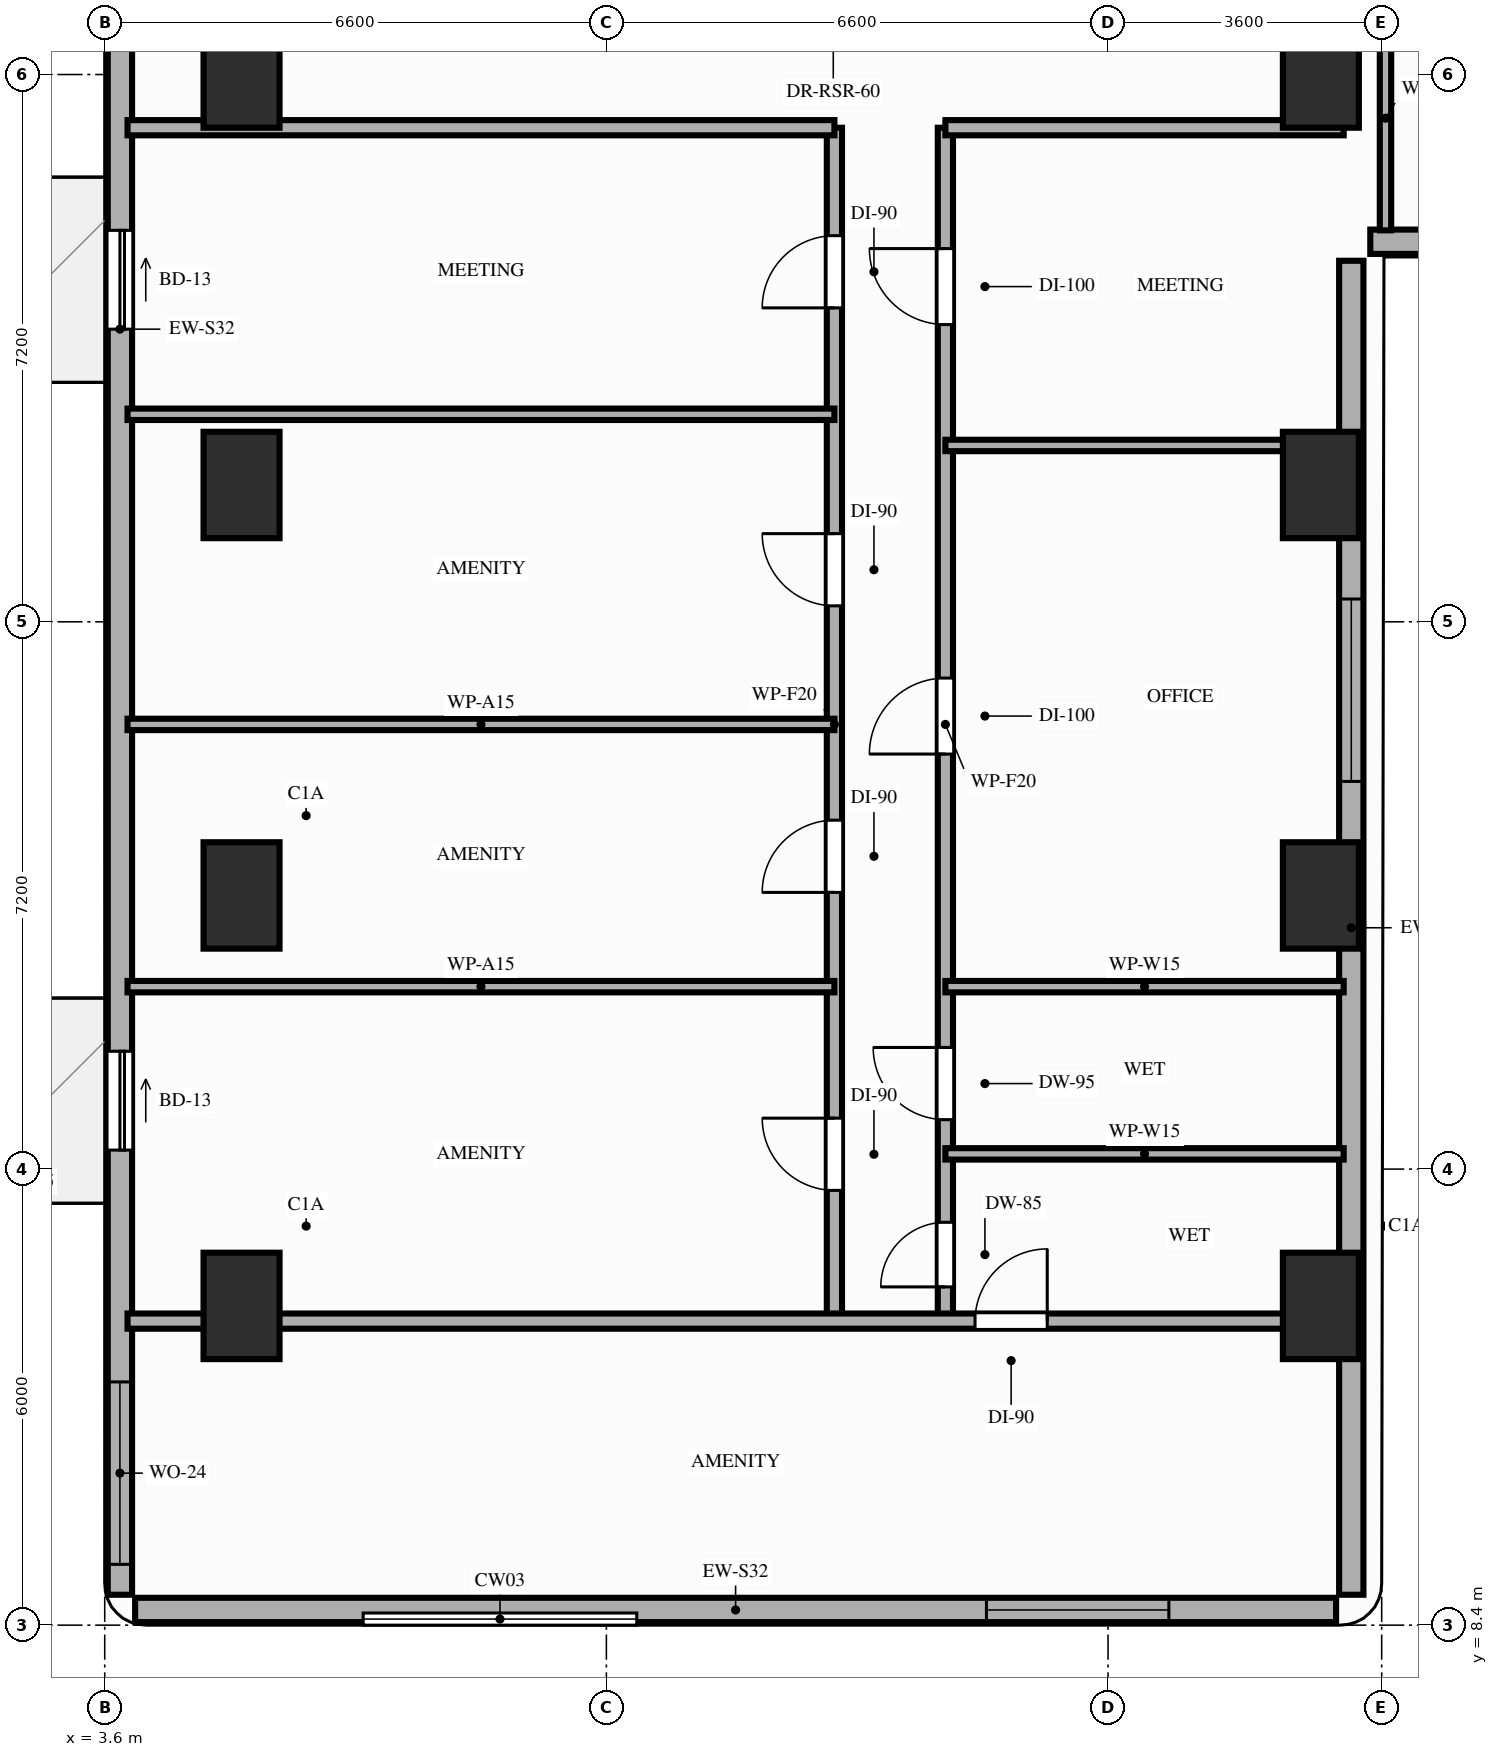
"""IFC4 building model, lengths in metres.
Left out: names, types, materials, properties, quantities, classifications, styles, units other than length and angle.
Written with IfcOpenShell. Run it as: python <this file> out.ifc"""

import sys

from ifc_helpers import new_model, si_unit, direction, frame, frame_2d, origin, origin_2d, place, context, subcontext, project, spatial, rectangle, extrude, element, fill, save


model = new_model("IFC4")
c1 = context("Model", 3, precision=1e-05, world=origin(), true_north=direction((0.0, 1.0)))
c2 = subcontext(c1, "Body", "Model", "MODEL_VIEW")
j1 = project(units=[si_unit("LENGTHUNIT", "METRE"), si_unit("PLANEANGLEUNIT", "RADIAN")], contexts=[c1])
p1 = place(None, origin())
s1 = spatial("IfcSite", under=j1, at=p1, CompositionType="ELEMENT")
p2 = place(p1, origin())
s2 = spatial("IfcBuilding", under=s1, at=p2, CompositionType="ELEMENT")
p3 = place(p2, frame((0.0, 0.0, 43.6)))
s3 = spatial("IfcBuildingStorey", under=s2, at=p3, CompositionType="ELEMENT", Elevation=43.6)
for number, where, z_axis, x_axis in (
    (1, (5.4, 12.6, 0.0), (0.0, 0.0, 1.0), (1.0, 0.0, 0.0)),
    (2, (19.6, 12.6, 0.0), (0.0, 0.0, 1.0), (1.0, 0.0, 0.0)),
    (3, (5.4, 18.0, 0.0), (0.0, 0.0, 1.0), (1.0, 0.0, 0.0)),
    (4, (19.6, 18.0, 0.0), (0.0, 0.0, 1.0), (1.0, 0.0, 0.0)),
    (5, (5.4, 23.4, 0.0), (0.0, 0.0, 1.0), (1.0, 0.0, 0.0)),
    (6, (19.6, 23.4, 0.0), (0.0, 0.0, 1.0), (1.0, 0.0, 0.0)),
    (7, (5.4, 28.8, 0.0), (0.0, 0.0, 1.0), (1.0, 0.0, 0.0)),
    (8, (19.6, 28.8, 0.0), (0.0, 0.0, 1.0), (1.0, 0.0, 0.0)),
):
    element("IfcColumn", number, at=place(p3, frame(where, z_axis=z_axis, x_axis=x_axis)), inside=s3, PredefinedType="COLUMN", context=c2, shape_type="SweptSolid", body=[
        extrude(rectangle(XDim=1.0, YDim=1.4, at=origin_2d()), origin(), (0.0, 0.0, 1.0), 3.2),
    ])
p4 = place(p3, frame((4.0, 8.6, 0.0), z_axis=(0.0, 0.0, 1.0), x_axis=(1.0, 0.0, 0.0)))
e9 = element("IfcWall", 9, at=p4, inside=s3, PredefinedType="STANDARD", context=c2, shape_type="SweptSolid", body=[
    extrude(rectangle(XDim=15.8, YDim=0.32, at=frame_2d((7.9, 0.0))), origin(), (0.0, 0.0, 1.0), 3.02),
])
p5 = place(p4, frame((11.2, 0.0, 0.85)))
e10 = element("IfcOpeningElement", 10, at=p5, cuts=e9, PredefinedType="OPENING", context=c2, shape_type="SweptSolid", body=[
    extrude(rectangle(XDim=2.4, YDim=1.8, at=frame_2d((1.2, 0.9))), frame((0.0, 0.17, 0.0), z_axis=(0.0, -1.0, 0.0), x_axis=(1.0, 0.0, 0.0)), (0.0, 0.0, 1.0), 0.34),
])
p6 = place(p3, frame((3.8, 42.1, 0.0), z_axis=(0.0, 0.0, 1.0), x_axis=(0.0, -1.0, 0.0)))
e11 = element("IfcWall", 11, at=p6, inside=s3, PredefinedType="STANDARD", context=c2, shape_type="SweptSolid", body=[
    extrude(rectangle(XDim=33.3, YDim=0.32, at=frame_2d((16.65, 0.0))), origin(), (0.0, 0.0, 1.0), 2.7),
])
p7 = place(p6, frame((26.15, 0.0, 0.0)))
e12 = element("IfcOpeningElement", 12, at=p7, cuts=e11, PredefinedType="OPENING", context=c2, shape_type="SweptSolid", body=[
    extrude(rectangle(XDim=1.3, YDim=2.08, at=frame_2d((0.65, 1.04))), frame((0.0, 0.17, 0.0), z_axis=(0.0, -1.0, 0.0), x_axis=(1.0, 0.0, 0.0)), (0.0, 0.0, 1.0), 0.34),
])
p8 = place(p6, frame((15.35, 0.0, 0.0)))
e13 = element("IfcOpeningElement", 13, at=p8, cuts=e11, PredefinedType="OPENING", context=c2, shape_type="SweptSolid", body=[
    extrude(rectangle(XDim=1.3, YDim=2.08, at=frame_2d((0.65, 1.04))), frame((0.0, 0.17, 0.0), z_axis=(0.0, -1.0, 0.0), x_axis=(1.0, 0.0, 0.0)), (0.0, 0.0, 1.0), 0.34),
])
p9 = place(p6, frame((30.5, 0.0, 0.85)))
e14 = element("IfcOpeningElement", 14, at=p9, cuts=e11, PredefinedType="OPENING", context=c2, shape_type="SweptSolid", body=[
    extrude(rectangle(XDim=2.4, YDim=1.6, at=frame_2d((1.2, 0.8))), frame((0.0, 0.17, 0.0), z_axis=(0.0, -1.0, 0.0), x_axis=(1.0, 0.0, 0.0)), (0.0, 0.0, 1.0), 0.34),
])
p10 = place(p6, frame((9.6, 0.0, 0.85)))
e15 = element("IfcOpeningElement", 15, at=p10, cuts=e11, PredefinedType="OPENING", context=c2, shape_type="SweptSolid", body=[
    extrude(rectangle(XDim=2.4, YDim=1.6, at=frame_2d((1.2, 0.8))), frame((0.0, 0.17, 0.0), z_axis=(0.0, -1.0, 0.0), x_axis=(1.0, 0.0, 0.0)), (0.0, 0.0, 1.0), 0.34),
])
p11 = place(p6, frame((3.5, 0.0, 0.85)))
e16 = element("IfcOpeningElement", 16, at=p11, cuts=e11, PredefinedType="OPENING", context=c2, shape_type="SweptSolid", body=[
    extrude(rectangle(XDim=2.4, YDim=1.6, at=frame_2d((1.2, 0.8))), frame((0.0, 0.17, 0.0), z_axis=(0.0, -1.0, 0.0), x_axis=(1.0, 0.0, 0.0)), (0.0, 0.0, 1.0), 0.34),
])
p12 = place(p3, frame((20.0, 8.8, 0.0), z_axis=(0.0, 0.0, 1.0), x_axis=(0.0, 1.0, 0.0)))
e17 = element("IfcWall", 17, at=p12, inside=s3, PredefinedType="STANDARD", context=c2, shape_type="SweptSolid", body=[
    extrude(rectangle(XDim=17.55, YDim=0.32, at=frame_2d((8.775, 0.0))), origin(), (0.0, 0.0, 1.0), 2.41),
])
p13 = place(p12, frame((10.7, 0.0, 0.85)))
e18 = element("IfcOpeningElement", 18, at=p13, cuts=e17, PredefinedType="OPENING", context=c2, shape_type="SweptSolid", body=[
    extrude(rectangle(XDim=2.4, YDim=1.31, at=frame_2d((1.2, 0.655))), frame((0.0, 0.17, 0.0), z_axis=(0.0, -1.0, 0.0), x_axis=(1.0, 0.0, 0.0)), (0.0, 0.0, 1.0), 0.34),
])
p14 = place(p3, frame((20.25, 26.6, 0.0), z_axis=(0.0, 0.0, 1.0), x_axis=(1.0, 0.0, 0.0)))
e19 = element("IfcWall", 19, at=p14, inside=s3, PredefinedType="STANDARD", context=c2, shape_type="SweptSolid", body=[
    extrude(rectangle(XDim=26.15, YDim=0.32, at=frame_2d((13.075, 0.0))), origin(), (0.0, 0.0, 1.0), 2.7),
])
p15 = place(p14, frame((1.95, 0.0, 0.85)))
e20 = element("IfcOpeningElement", 20, at=p15, cuts=e19, PredefinedType="OPENING", context=c2, shape_type="SweptSolid", body=[
    extrude(rectangle(XDim=2.4, YDim=1.6, at=frame_2d((1.2, 0.8))), frame((0.0, 0.17, 0.0), z_axis=(0.0, -1.0, 0.0), x_axis=(1.0, 0.0, 0.0)), (0.0, 0.0, 1.0), 0.34),
])
p16 = place(p14, frame((7.45, 0.0, 0.85)))
e21 = element("IfcOpeningElement", 21, at=p16, cuts=e19, PredefinedType="OPENING", context=c2, shape_type="SweptSolid", body=[
    extrude(rectangle(XDim=2.4, YDim=1.6, at=frame_2d((1.2, 0.8))), frame((0.0, 0.17, 0.0), z_axis=(0.0, -1.0, 0.0), x_axis=(1.0, 0.0, 0.0)), (0.0, 0.0, 1.0), 0.34),
])
p17 = place(p14, frame((21.95, 0.0, 0.85)))
e22 = element("IfcOpeningElement", 22, at=p17, cuts=e19, PredefinedType="OPENING", context=c2, shape_type="SweptSolid", body=[
    extrude(rectangle(XDim=2.4, YDim=1.6, at=frame_2d((1.2, 0.8))), frame((0.0, 0.17, 0.0), z_axis=(0.0, -1.0, 0.0), x_axis=(1.0, 0.0, 0.0)), (0.0, 0.0, 1.0), 0.34),
])
p18 = place(p3, frame((13.2, 12.4, 0.0), z_axis=(0.0, 0.0, 1.0), x_axis=(0.0, 1.0, 0.0)))
e23 = element("IfcWall", 23, at=p18, inside=s3, PredefinedType="PARTITIONING", context=c2, shape_type="SweptSolid", body=[
    extrude(rectangle(XDim=15.7, YDim=0.2, at=frame_2d((7.85, 0.0))), origin(), (0.0, 0.0, 1.0), 2.41),
])
p19 = place(p18, frame((1.72, 0.0, 0.0)))
e24 = element("IfcOpeningElement", 24, at=p19, cuts=e23, PredefinedType="OPENING", context=c2, shape_type="SweptSolid", body=[
    extrude(rectangle(XDim=0.95, YDim=2.15, at=frame_2d((0.475, 1.075))), frame((0.0, 0.11, 0.0), z_axis=(0.0, -1.0, 0.0), x_axis=(1.0, 0.0, 0.0)), (0.0, 0.0, 1.0), 0.22),
])
p20 = place(p18, frame((5.64, 0.0, 0.0)))
e25 = element("IfcOpeningElement", 25, at=p20, cuts=e23, PredefinedType="OPENING", context=c2, shape_type="SweptSolid", body=[
    extrude(rectangle(XDim=0.95, YDim=2.15, at=frame_2d((0.475, 1.075))), frame((0.0, 0.11, 0.0), z_axis=(0.0, -1.0, 0.0), x_axis=(1.0, 0.0, 0.0)), (0.0, 0.0, 1.0), 0.22),
])
p21 = place(p18, frame((9.41, 0.0, 0.0)))
e26 = element("IfcOpeningElement", 26, at=p21, cuts=e23, PredefinedType="OPENING", context=c2, shape_type="SweptSolid", body=[
    extrude(rectangle(XDim=0.95, YDim=2.15, at=frame_2d((0.475, 1.075))), frame((0.0, 0.11, 0.0), z_axis=(0.0, -1.0, 0.0), x_axis=(1.0, 0.0, 0.0)), (0.0, 0.0, 1.0), 0.22),
])
p22 = place(p18, frame((13.33, 0.0, 0.0)))
e27 = element("IfcOpeningElement", 27, at=p22, cuts=e23, PredefinedType="OPENING", context=c2, shape_type="SweptSolid", body=[
    extrude(rectangle(XDim=0.95, YDim=2.15, at=frame_2d((0.475, 1.075))), frame((0.0, 0.11, 0.0), z_axis=(0.0, -1.0, 0.0), x_axis=(1.0, 0.0, 0.0)), (0.0, 0.0, 1.0), 0.22),
])
p23 = place(p3, frame((14.66, 12.4, 0.0), z_axis=(0.0, 0.0, 1.0), x_axis=(0.0, 1.0, 0.0)))
e28 = element("IfcWall", 28, at=p23, inside=s3, PredefinedType="PARTITIONING", context=c2, shape_type="SweptSolid", body=[
    extrude(rectangle(XDim=15.7, YDim=0.2, at=frame_2d((7.85, 0.0))), origin(), (0.0, 0.0, 1.0), 2.41),
])
p24 = place(p23, frame((0.45, 0.0, 0.0)))
e29 = element("IfcOpeningElement", 29, at=p24, cuts=e28, PredefinedType="OPENING", context=c2, shape_type="SweptSolid", body=[
    extrude(rectangle(XDim=0.85, YDim=2.1, at=frame_2d((0.425, 1.05))), frame((0.0, 0.11, 0.0), z_axis=(0.0, -1.0, 0.0), x_axis=(1.0, 0.0, 0.0)), (0.0, 0.0, 1.0), 0.22),
])
p25 = place(p23, frame((2.65, 0.0, 0.0)))
e30 = element("IfcOpeningElement", 30, at=p25, cuts=e28, PredefinedType="OPENING", context=c2, shape_type="SweptSolid", body=[
    extrude(rectangle(XDim=0.95, YDim=2.1, at=frame_2d((0.475, 1.05))), frame((0.0, 0.11, 0.0), z_axis=(0.0, -1.0, 0.0), x_axis=(1.0, 0.0, 0.0)), (0.0, 0.0, 1.0), 0.22),
])
p26 = place(p23, frame((7.46, 0.0, 0.0)))
e31 = element("IfcOpeningElement", 31, at=p26, cuts=e28, PredefinedType="OPENING", context=c2, shape_type="SweptSolid", body=[
    extrude(rectangle(XDim=1.0, YDim=2.15, at=frame_2d((0.5, 1.075))), frame((0.0, 0.11, 0.0), z_axis=(0.0, -1.0, 0.0), x_axis=(1.0, 0.0, 0.0)), (0.0, 0.0, 1.0), 0.22),
])
p27 = place(p23, frame((13.11, 0.0, 0.0)))
e32 = element("IfcOpeningElement", 32, at=p27, cuts=e28, PredefinedType="OPENING", context=c2, shape_type="SweptSolid", body=[
    extrude(rectangle(XDim=1.0, YDim=2.15, at=frame_2d((0.5, 1.075))), frame((0.0, 0.11, 0.0), z_axis=(0.0, -1.0, 0.0), x_axis=(1.0, 0.0, 0.0)), (0.0, 0.0, 1.0), 0.22),
])
p28 = place(p3, frame((3.9, 12.4, 0.0), z_axis=(0.0, 0.0, 1.0), x_axis=(1.0, 0.0, 0.0)))
e33 = element("IfcWall", 33, at=p28, inside=s3, PredefinedType="PARTITIONING", context=c2, shape_type="SweptSolid", body=[
    extrude(rectangle(XDim=16.0, YDim=0.2, at=frame_2d((8.0, 0.0))), origin(), (0.0, 0.0, 1.0), 2.41),
])
p29 = place(p28, frame((11.15, 0.0, 0.0)))
e34 = element("IfcOpeningElement", 34, at=p29, cuts=e33, PredefinedType="OPENING", context=c2, shape_type="SweptSolid", body=[
    extrude(rectangle(XDim=0.95, YDim=2.15, at=frame_2d((0.475, 1.075))), frame((0.0, 0.11, 0.0), z_axis=(0.0, -1.0, 0.0), x_axis=(1.0, 0.0, 0.0)), (0.0, 0.0, 1.0), 0.22),
])
p30 = place(p3, frame((3.9, 28.1, 0.0), z_axis=(0.0, 0.0, 1.0), x_axis=(1.0, 0.0, 0.0)))
e35 = element("IfcWall", 35, at=p30, inside=s3, PredefinedType="PARTITIONING", context=c2, shape_type="SweptSolid", body=[
    extrude(rectangle(XDim=9.3, YDim=0.2, at=frame_2d((4.65, 0.0))), origin(), (0.0, 0.0, 1.0), 2.41),
])
p31 = place(p3, frame((14.66, 28.1, 0.0), z_axis=(0.0, 0.0, 1.0), x_axis=(1.0, 0.0, 0.0)))
e36 = element("IfcWall", 36, at=p31, inside=s3, PredefinedType="PARTITIONING", context=c2, shape_type="SweptSolid", body=[
    extrude(rectangle(XDim=5.24, YDim=0.2, at=frame_2d((2.62, 0.0))), origin(), (0.0, 0.0, 1.0), 2.41),
])
p32 = place(p3, frame((20.45, 26.75, 0.0), z_axis=(0.0, 0.0, 1.0), x_axis=(0.0, 1.0, 0.0)))
e37 = element("IfcWall", 37, at=p32, inside=s3, PredefinedType="PARTITIONING", context=c2, shape_type="SweptSolid", body=[
    extrude(rectangle(XDim=2.95, YDim=0.15, at=frame_2d((1.475, 0.0))), origin(), (0.0, 0.0, 1.0), 2.41),
])
for number, where, z_axis, x_axis in (
    (38, (3.9, 16.8, 0.0), (0.0, 0.0, 1.0), (1.0, 0.0, 0.0)),
    (39, (3.9, 20.25, 0.0), (0.0, 0.0, 1.0), (1.0, 0.0, 0.0)),
    (40, (3.9, 24.33, 0.0), (0.0, 0.0, 1.0), (1.0, 0.0, 0.0)),
):
    element("IfcWall", number, at=place(p3, frame(where, z_axis=z_axis, x_axis=x_axis)), inside=s3, PredefinedType="PARTITIONING", context=c2, shape_type="SweptSolid", body=[
        extrude(rectangle(XDim=9.3, YDim=0.15, at=frame_2d((4.65, 0.0))), origin(), (0.0, 0.0, 1.0), 2.41),
    ])
for number, where, z_axis, x_axis in (
    (41, (14.66, 14.6, 0.0), (0.0, 0.0, 1.0), (1.0, 0.0, 0.0)),
    (42, (14.66, 16.8, 0.0), (0.0, 0.0, 1.0), (1.0, 0.0, 0.0)),
    (43, (14.66, 23.92, 0.0), (0.0, 0.0, 1.0), (1.0, 0.0, 0.0)),
):
    element("IfcWall", number, at=place(p3, frame(where, z_axis=z_axis, x_axis=x_axis)), inside=s3, PredefinedType="PARTITIONING", context=c2, shape_type="SweptSolid", body=[
        extrude(rectangle(XDim=5.24, YDim=0.15, at=frame_2d((2.62, 0.0))), origin(), (0.0, 0.0, 1.0), 2.41),
    ])
p33 = place(p7, origin())
e44 = element("IfcDoor", 44, at=p33, inside=s3, OperationType="SLIDING_TO_LEFT", PredefinedType="DOOR", context=c2, shape_type="SweptSolid", body=[
    extrude(rectangle(XDim=1.3, YDim=2.08, at=frame_2d((0.65, 1.04))), frame((0.0, 0.025, 0.0), z_axis=(0.0, -1.0, 0.0), x_axis=(1.0, 0.0, 0.0)), (0.0, 0.0, 1.0), 0.05),
])
fill(e12, e44)
p34 = place(p8, origin())
e45 = element("IfcDoor", 45, at=p34, inside=s3, OperationType="SLIDING_TO_LEFT", PredefinedType="DOOR", context=c2, shape_type="SweptSolid", body=[
    extrude(rectangle(XDim=1.3, YDim=2.08, at=frame_2d((0.65, 1.04))), frame((0.0, 0.025, 0.0), z_axis=(0.0, -1.0, 0.0), x_axis=(1.0, 0.0, 0.0)), (0.0, 0.0, 1.0), 0.05),
])
fill(e13, e45)
p35 = place(p9, origin())
e46 = element("IfcWindow", 46, at=p35, inside=s3, PartitioningType="SINGLE_PANEL", PredefinedType="WINDOW", context=c2, shape_type="SweptSolid", body=[
    extrude(rectangle(XDim=2.4, YDim=1.6, at=frame_2d((1.2, 0.8))), frame((0.0, 0.03, 0.0), z_axis=(0.0, -1.0, 0.0), x_axis=(1.0, 0.0, 0.0)), (0.0, 0.0, 1.0), 0.06),
])
fill(e14, e46)
p36 = place(p13, origin())
e47 = element("IfcWindow", 47, at=p36, inside=s3, PartitioningType="SINGLE_PANEL", PredefinedType="WINDOW", context=c2, shape_type="SweptSolid", body=[
    extrude(rectangle(XDim=2.4, YDim=1.31, at=frame_2d((1.2, 0.655))), frame((0.0, 0.03, 0.0), z_axis=(0.0, -1.0, 0.0), x_axis=(1.0, 0.0, 0.0)), (0.0, 0.0, 1.0), 0.06),
])
fill(e18, e47)
p37 = place(p5, origin())
e48 = element("IfcWindow", 48, at=p37, inside=s3, PartitioningType="SINGLE_PANEL", PredefinedType="WINDOW", context=c2, shape_type="SweptSolid", body=[
    extrude(rectangle(XDim=2.4, YDim=1.8, at=frame_2d((1.2, 0.9))), frame((0.0, 0.03, 0.0), z_axis=(0.0, -1.0, 0.0), x_axis=(1.0, 0.0, 0.0)), (0.0, 0.0, 1.0), 0.06),
])
fill(e10, e48)
p38 = place(p19, origin())
e49 = element("IfcDoor", 49, at=p38, inside=s3, OperationType="SINGLE_SWING_RIGHT", PredefinedType="DOOR", context=c2, shape_type="SweptSolid", body=[
    extrude(rectangle(XDim=0.95, YDim=2.15, at=frame_2d((0.475, 1.075))), frame((0.0, 0.025, 0.0), z_axis=(0.0, -1.0, 0.0), x_axis=(1.0, 0.0, 0.0)), (0.0, 0.0, 1.0), 0.05),
])
fill(e24, e49)
p39 = place(p20, origin())
e50 = element("IfcDoor", 50, at=p39, inside=s3, OperationType="SINGLE_SWING_LEFT", PredefinedType="DOOR", context=c2, shape_type="SweptSolid", body=[
    extrude(rectangle(XDim=0.95, YDim=2.15, at=frame_2d((0.475, 1.075))), frame((0.0, 0.025, 0.0), z_axis=(0.0, -1.0, 0.0), x_axis=(1.0, 0.0, 0.0)), (0.0, 0.0, 1.0), 0.05),
])
fill(e25, e50)
p40 = place(p21, origin())
e51 = element("IfcDoor", 51, at=p40, inside=s3, OperationType="SINGLE_SWING_RIGHT", PredefinedType="DOOR", context=c2, shape_type="SweptSolid", body=[
    extrude(rectangle(XDim=0.95, YDim=2.15, at=frame_2d((0.475, 1.075))), frame((0.0, 0.025, 0.0), z_axis=(0.0, -1.0, 0.0), x_axis=(1.0, 0.0, 0.0)), (0.0, 0.0, 1.0), 0.05),
])
fill(e26, e51)
p41 = place(p22, origin())
e52 = element("IfcDoor", 52, at=p41, inside=s3, OperationType="SINGLE_SWING_LEFT", PredefinedType="DOOR", context=c2, shape_type="SweptSolid", body=[
    extrude(rectangle(XDim=0.95, YDim=2.15, at=frame_2d((0.475, 1.075))), frame((0.0, 0.025, 0.0), z_axis=(0.0, -1.0, 0.0), x_axis=(1.0, 0.0, 0.0)), (0.0, 0.0, 1.0), 0.05),
])
fill(e27, e52)
p42 = place(p29, origin())
e53 = element("IfcDoor", 53, at=p42, inside=s3, OperationType="SINGLE_SWING_RIGHT", PredefinedType="DOOR", context=c2, shape_type="SweptSolid", body=[
    extrude(rectangle(XDim=0.95, YDim=2.15, at=frame_2d((0.475, 1.075))), frame((0.0, 0.025, 0.0), z_axis=(0.0, -1.0, 0.0), x_axis=(1.0, 0.0, 0.0)), (0.0, 0.0, 1.0), 0.05),
])
fill(e34, e53)
p43 = place(p24, origin())
e54 = element("IfcDoor", 54, at=p43, inside=s3, OperationType="SINGLE_SWING_LEFT", PredefinedType="DOOR", context=c2, shape_type="SweptSolid", body=[
    extrude(rectangle(XDim=0.85, YDim=2.1, at=frame_2d((0.425, 1.05))), frame((0.0, 0.025, 0.0), z_axis=(0.0, -1.0, 0.0), x_axis=(1.0, 0.0, 0.0)), (0.0, 0.0, 1.0), 0.05),
])
fill(e29, e54)
p44 = place(p25, origin())
e55 = element("IfcDoor", 55, at=p44, inside=s3, OperationType="SINGLE_SWING_RIGHT", PredefinedType="DOOR", context=c2, shape_type="SweptSolid", body=[
    extrude(rectangle(XDim=0.95, YDim=2.1, at=frame_2d((0.475, 1.05))), frame((0.0, 0.025, 0.0), z_axis=(0.0, -1.0, 0.0), x_axis=(1.0, 0.0, 0.0)), (0.0, 0.0, 1.0), 0.05),
])
fill(e30, e55)
p45 = place(p26, origin())
e56 = element("IfcDoor", 56, at=p45, inside=s3, OperationType="SINGLE_SWING_LEFT", PredefinedType="DOOR", context=c2, shape_type="SweptSolid", body=[
    extrude(rectangle(XDim=1.0, YDim=2.15, at=frame_2d((0.5, 1.075))), frame((0.0, 0.025, 0.0), z_axis=(0.0, -1.0, 0.0), x_axis=(1.0, 0.0, 0.0)), (0.0, 0.0, 1.0), 0.05),
])
fill(e31, e56)
p46 = place(p27, origin())
e57 = element("IfcDoor", 57, at=p46, inside=s3, OperationType="SINGLE_SWING_RIGHT", PredefinedType="DOOR", context=c2, shape_type="SweptSolid", body=[
    extrude(rectangle(XDim=1.0, YDim=2.15, at=frame_2d((0.5, 1.075))), frame((0.0, 0.025, 0.0), z_axis=(0.0, -1.0, 0.0), x_axis=(1.0, 0.0, 0.0)), (0.0, 0.0, 1.0), 0.05),
])
fill(e32, e57)
save(model, sys.argv[1])
